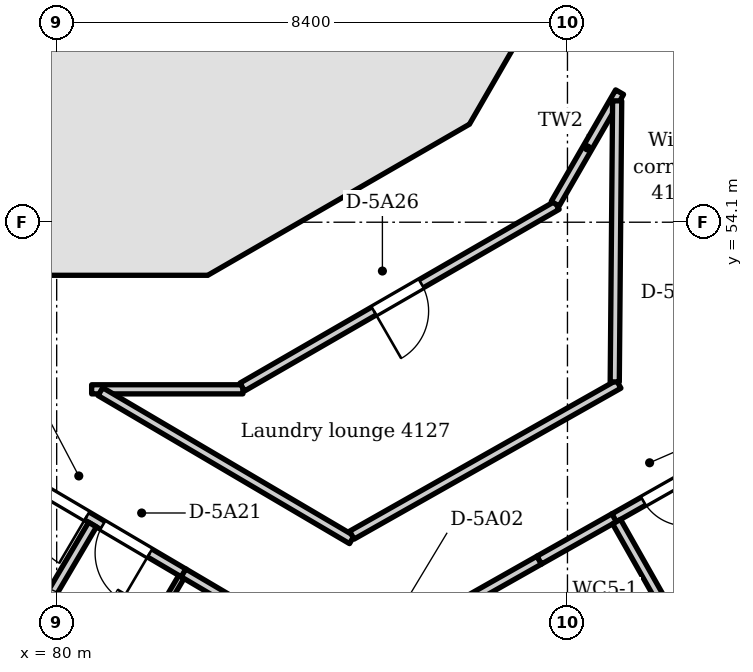
"""IFC4 building model, lengths in metres.
Left out: names, types, materials, properties, quantities, classifications, styles, units other than length and angle.
Written with IfcOpenShell. Run it as: python <this file> out.ifc"""

import sys

from ifc_helpers import new_model, si_unit, direction, frame, frame_2d, origin, place, context, subcontext, project, spatial, polyline, rectangle, outline, extrude, element, fill, save


model = new_model("IFC4")
c1 = context("Model", 3, precision=1e-05, world=origin(), true_north=direction((0.0, 1.0)))
c2 = subcontext(c1, "Body", "Model", "MODEL_VIEW")
j1 = project(units=[si_unit("LENGTHUNIT", "METRE"), si_unit("PLANEANGLEUNIT", "RADIAN")], contexts=[c1])
p1 = place(None, origin())
s1 = spatial("IfcSite", under=j1, at=p1, CompositionType="ELEMENT")
p2 = place(p1, origin())
s2 = spatial("IfcBuilding", under=s1, at=p2, CompositionType="ELEMENT")
p3 = place(p2, frame((0.0, 0.0, 161.1)))
s3 = spatial("IfcBuildingStorey", under=s2, at=p3, CompositionType="ELEMENT", Elevation=161.1)
p4 = place(p3, frame((77.515, 53.677, 0.0), z_axis=(0.0, 0.0, 1.0), x_axis=(1.0, 0.0, 0.0)))
e1 = element("IfcWall", 1, at=p4, inside=s3, PredefinedType="SHEAR", context=c2, shape_type="SweptSolid", body=[
    extrude(outline(polyline([(0.0, -0.45), (4.969, -0.45), (4.728, 0.45), (0.241, 0.45), (0.0, -0.45)])), origin(), (0.0, 0.0, 1.0), 3.6),
])
p5 = place(p4, frame((1.485, 0.0, 0.0)))
e2 = element("IfcOpeningElement", 2, at=p5, cuts=e1, PredefinedType="OPENING", context=c2, shape_type="SweptSolid", body=[
    extrude(rectangle(XDim=2.0, YDim=2.1, at=frame_2d((1.0, 1.05))), frame((0.0, 0.46, 0.0), z_axis=(0.0, -1.0, 0.0), x_axis=(1.0, 0.0, 0.0)), (0.0, 0.0, 1.0), 0.92),
])
p6 = place(p3, frame((82.26, 53.617, 0.0), z_axis=(0.0, 0.0, 1.0), x_axis=(0.866003133579, 0.500038571144, 0.0)))
e3 = element("IfcWall", 3, at=p6, inside=s3, PredefinedType="SHEAR", context=c2, shape_type="SweptSolid", body=[
    extrude(outline(polyline([(0.0, -0.45), (4.969, -0.45), (4.728, 0.45), (0.241, 0.45), (0.0, -0.45)])), origin(), (0.0, 0.0, 1.0), 3.6),
])
p7 = place(p6, frame((0.895, 0.0, 0.0)))
e4 = element("IfcOpeningElement", 4, at=p7, cuts=e3, PredefinedType="OPENING", context=c2, shape_type="SweptSolid", body=[
    extrude(rectangle(XDim=0.9, YDim=2.1, at=frame_2d((0.45, 1.05))), frame((0.0, 0.46, 0.0), z_axis=(0.0, -1.0, 0.0), x_axis=(1.0, 0.0, 0.0)), (0.0, 0.0, 1.0), 0.92),
])
p8 = place(p6, frame((3.184, 0.0, 0.0)))
e5 = element("IfcOpeningElement", 5, at=p8, cuts=e3, PredefinedType="OPENING", context=c2, shape_type="SweptSolid", body=[
    extrude(rectangle(XDim=0.9, YDim=2.1, at=frame_2d((0.45, 1.05))), frame((0.0, 0.46, 0.0), z_axis=(0.0, -1.0, 0.0), x_axis=(1.0, 0.0, 0.0)), (0.0, 0.0, 1.0), 0.92),
])
p9 = place(p3, frame((86.398, 55.937, 0.0), z_axis=(0.0, 0.0, 1.0), x_axis=(0.500038571144, 0.866003133579, 0.0)))
e6 = element("IfcWall", 6, at=p9, inside=s3, PredefinedType="SHEAR", context=c2, shape_type="SweptSolid", body=[
    extrude(outline(polyline([(0.0, -0.45), (4.969, -0.45), (4.728, 0.45), (0.241, 0.45), (0.0, -0.45)])), origin(), (0.0, 0.0, 1.0), 3.6),
])
p10 = place(p9, frame((1.785, 0.0, 0.0)))
e7 = element("IfcOpeningElement", 7, at=p10, cuts=e6, PredefinedType="OPENING", context=c2, shape_type="SweptSolid", body=[
    extrude(rectangle(XDim=1.4, YDim=2.1, at=frame_2d((0.7, 1.05))), frame((0.0, 0.46, 0.0), z_axis=(0.0, -1.0, 0.0), x_axis=(1.0, 0.0, 0.0)), (0.0, 0.0, 1.0), 0.92),
])
p11 = place(p3, frame((81.15, 59.1, 0.0), z_axis=(0.0, 0.0, 1.0), x_axis=(0.0, -1.0, 0.0)))
e8 = element("IfcWall", 8, at=p11, inside=s3, PredefinedType="SHEAR", context=c2, shape_type="SweptSolid", body=[
    extrude(rectangle(XDim=4.973, YDim=0.3, at=frame_2d((2.487, 0.0))), origin(), (0.0, 0.0, 1.0), 3.6),
])
p12 = place(p11, frame((1.3, 0.0, 0.0)))
e9 = element("IfcOpeningElement", 9, at=p12, cuts=e8, PredefinedType="OPENING", context=c2, shape_type="SweptSolid", body=[
    extrude(rectangle(XDim=1.1, YDim=2.1, at=frame_2d((0.55, 1.05))), frame((0.0, 0.16, 0.0), z_axis=(0.0, -1.0, 0.0), x_axis=(1.0, 0.0, 0.0)), (0.0, 0.0, 1.0), 0.32),
])
p13 = place(p3, frame((80.225, 60.552, 0.0), z_axis=(0.0, 0.0, 1.0), x_axis=(0.866028135082, -0.499995269223, 0.0)))
e10 = element("IfcWall", 10, at=p13, inside=s3, PredefinedType="SHEAR", context=c2, shape_type="SweptSolid", body=[
    extrude(rectangle(XDim=7.204, YDim=0.3, at=frame_2d((3.602, 0.0))), origin(), (0.0, 0.0, 1.0), 3.6),
])
p14 = place(p3, frame((80.354, 60.886, 0.0), z_axis=(0.0, 0.0, 1.0), x_axis=(-0.866047706748, -0.499961368145, 0.0)))
e11 = element("IfcWall", 11, at=p14, inside=s3, PredefinedType="SHEAR", context=c2, shape_type="SweptSolid", body=[
    extrude(rectangle(XDim=7.873, YDim=0.3, at=frame_2d((3.936, 0.0))), origin(), (0.0, 0.0, 1.0), 3.6),
])
p15 = place(p3, frame((90.139, 36.597, 0.0), z_axis=(0.0, 0.0, 1.0), x_axis=(-0.861630336939, 0.507536365659, 0.0)))
e12 = element("IfcWall", 12, at=p15, inside=s3, PredefinedType="SOLIDWALL", context=c2, shape_type="SweptSolid", body=[
    extrude(outline(polyline([(0.149, 0.075), (0.149, -0.075), (43.617, -0.075), (43.617, 0.075), (0.149, 0.075)])), origin(), (0.0, 0.0, 1.0), 3.3),
])
p16 = place(p15, frame((1.224, 0.0, 0.0)))
e13 = element("IfcOpeningElement", 13, at=p16, cuts=e12, PredefinedType="OPENING", context=c2, shape_type="SweptSolid", body=[
    extrude(rectangle(XDim=1.8, YDim=2.6, at=frame_2d((0.9, 1.3))), frame((0.0, 0.085, 0.0), z_axis=(0.0, -1.0, 0.0), x_axis=(1.0, 0.0, 0.0)), (0.0, 0.0, 1.0), 0.17),
])
p17 = place(p15, frame((4.571, 0.0, 0.0)))
e14 = element("IfcOpeningElement", 14, at=p17, cuts=e12, PredefinedType="OPENING", context=c2, shape_type="SweptSolid", body=[
    extrude(rectangle(XDim=1.8, YDim=2.6, at=frame_2d((0.9, 1.3))), frame((0.0, 0.085, 0.0), z_axis=(0.0, -1.0, 0.0), x_axis=(1.0, 0.0, 0.0)), (0.0, 0.0, 1.0), 0.17),
])
p18 = place(p15, frame((8.218, 0.0, 0.0)))
e15 = element("IfcOpeningElement", 15, at=p18, cuts=e12, PredefinedType="OPENING", context=c2, shape_type="SweptSolid", body=[
    extrude(rectangle(XDim=1.8, YDim=2.6, at=frame_2d((0.9, 1.3))), frame((0.0, 0.085, 0.0), z_axis=(0.0, -1.0, 0.0), x_axis=(1.0, 0.0, 0.0)), (0.0, 0.0, 1.0), 0.17),
])
p19 = place(p15, frame((11.865, 0.0, 0.0)))
e16 = element("IfcOpeningElement", 16, at=p19, cuts=e12, PredefinedType="OPENING", context=c2, shape_type="SweptSolid", body=[
    extrude(rectangle(XDim=1.8, YDim=2.6, at=frame_2d((0.9, 1.3))), frame((0.0, 0.085, 0.0), z_axis=(0.0, -1.0, 0.0), x_axis=(1.0, 0.0, 0.0)), (0.0, 0.0, 1.0), 0.17),
])
p20 = place(p15, frame((15.512, 0.0, 0.0)))
e17 = element("IfcOpeningElement", 17, at=p20, cuts=e12, PredefinedType="OPENING", context=c2, shape_type="SweptSolid", body=[
    extrude(rectangle(XDim=1.8, YDim=2.6, at=frame_2d((0.9, 1.3))), frame((0.0, 0.085, 0.0), z_axis=(0.0, -1.0, 0.0), x_axis=(1.0, 0.0, 0.0)), (0.0, 0.0, 1.0), 0.17),
])
p21 = place(p15, frame((19.16, 0.0, 0.0)))
e18 = element("IfcOpeningElement", 18, at=p21, cuts=e12, PredefinedType="OPENING", context=c2, shape_type="SweptSolid", body=[
    extrude(rectangle(XDim=1.8, YDim=2.6, at=frame_2d((0.9, 1.3))), frame((0.0, 0.085, 0.0), z_axis=(0.0, -1.0, 0.0), x_axis=(1.0, 0.0, 0.0)), (0.0, 0.0, 1.0), 0.17),
])
p22 = place(p15, frame((22.807, 0.0, 0.0)))
e19 = element("IfcOpeningElement", 19, at=p22, cuts=e12, PredefinedType="OPENING", context=c2, shape_type="SweptSolid", body=[
    extrude(rectangle(XDim=1.8, YDim=2.6, at=frame_2d((0.9, 1.3))), frame((0.0, 0.085, 0.0), z_axis=(0.0, -1.0, 0.0), x_axis=(1.0, 0.0, 0.0)), (0.0, 0.0, 1.0), 0.17),
])
p23 = place(p15, frame((26.454, 0.0, 0.0)))
e20 = element("IfcOpeningElement", 20, at=p23, cuts=e12, PredefinedType="OPENING", context=c2, shape_type="SweptSolid", body=[
    extrude(rectangle(XDim=1.8, YDim=2.6, at=frame_2d((0.9, 1.3))), frame((0.0, 0.085, 0.0), z_axis=(0.0, -1.0, 0.0), x_axis=(1.0, 0.0, 0.0)), (0.0, 0.0, 1.0), 0.17),
])
p24 = place(p15, frame((30.101, 0.0, 0.0)))
e21 = element("IfcOpeningElement", 21, at=p24, cuts=e12, PredefinedType="OPENING", context=c2, shape_type="SweptSolid", body=[
    extrude(rectangle(XDim=1.8, YDim=2.6, at=frame_2d((0.9, 1.3))), frame((0.0, 0.085, 0.0), z_axis=(0.0, -1.0, 0.0), x_axis=(1.0, 0.0, 0.0)), (0.0, 0.0, 1.0), 0.17),
])
p25 = place(p15, frame((33.748, 0.0, 0.0)))
e22 = element("IfcOpeningElement", 22, at=p25, cuts=e12, PredefinedType="OPENING", context=c2, shape_type="SweptSolid", body=[
    extrude(rectangle(XDim=1.8, YDim=2.6, at=frame_2d((0.9, 1.3))), frame((0.0, 0.085, 0.0), z_axis=(0.0, -1.0, 0.0), x_axis=(1.0, 0.0, 0.0)), (0.0, 0.0, 1.0), 0.17),
])
p26 = place(p15, frame((37.396, 0.0, 0.0)))
e23 = element("IfcOpeningElement", 23, at=p26, cuts=e12, PredefinedType="OPENING", context=c2, shape_type="SweptSolid", body=[
    extrude(rectangle(XDim=1.8, YDim=2.6, at=frame_2d((0.9, 1.3))), frame((0.0, 0.085, 0.0), z_axis=(0.0, -1.0, 0.0), x_axis=(1.0, 0.0, 0.0)), (0.0, 0.0, 1.0), 0.17),
])
p27 = place(p15, frame((40.743, 0.0, 0.0)))
e24 = element("IfcOpeningElement", 24, at=p27, cuts=e12, PredefinedType="OPENING", context=c2, shape_type="SweptSolid", body=[
    extrude(rectangle(XDim=1.8, YDim=2.6, at=frame_2d((0.9, 1.3))), frame((0.0, 0.085, 0.0), z_axis=(0.0, -1.0, 0.0), x_axis=(1.0, 0.0, 0.0)), (0.0, 0.0, 1.0), 0.17),
])
p28 = place(p3, frame((76.96, 51.352, 0.0), z_axis=(0.0, 0.0, 1.0), x_axis=(0.861634811964, -0.507528768457, 0.0)))
e25 = element("IfcWall", 25, at=p28, inside=s3, PredefinedType="PARTITIONING", context=c2, shape_type="SweptSolid", body=[
    extrude(rectangle(XDim=5.956, YDim=0.15, at=frame_2d((2.978, 0.0))), origin(), (0.0, 0.0, 1.0), 3.3),
])
p29 = place(p28, frame((4.406, 0.0, 0.0)))
e26 = element("IfcOpeningElement", 26, at=p29, cuts=e25, PredefinedType="OPENING", context=c2, shape_type="SweptSolid", body=[
    extrude(rectangle(XDim=0.9, YDim=2.1, at=frame_2d((0.45, 1.05))), frame((0.0, 0.085, 0.0), z_axis=(0.0, -1.0, 0.0), x_axis=(1.0, 0.0, 0.0)), (0.0, 0.0, 1.0), 0.17),
])
p30 = place(p28, frame((3.206, 0.0, 0.0)))
e27 = element("IfcOpeningElement", 27, at=p30, cuts=e25, PredefinedType="OPENING", context=c2, shape_type="SweptSolid", body=[
    extrude(rectangle(XDim=0.9, YDim=2.1, at=frame_2d((0.45, 1.05))), frame((0.0, 0.085, 0.0), z_axis=(0.0, -1.0, 0.0), x_axis=(1.0, 0.0, 0.0)), (0.0, 0.0, 1.0), 0.17),
])
p31 = place(p3, frame((77.607, 44.066, 0.0), z_axis=(0.0, 0.0, 1.0), x_axis=(0.507572206676, 0.861609224074, 0.0)))
e28 = element("IfcWall", 28, at=p31, inside=s3, PredefinedType="PARTITIONING", context=c2, shape_type="SweptSolid", body=[
    extrude(rectangle(XDim=5.874, YDim=0.15, at=frame_2d((2.937, 0.0))), origin(), (0.0, 0.0, 1.0), 3.3),
])
p32 = place(p3, frame((80.575, 51.352, 0.0), z_axis=(0.0, 0.0, 1.0), x_axis=(1.0, 0.0, 0.0)))
e29 = element("IfcWall", 29, at=p32, inside=s3, PredefinedType="PARTITIONING", context=c2, shape_type="SweptSolid", body=[
    extrude(rectangle(XDim=2.487, YDim=0.15, at=frame_2d((1.244, 0.0))), origin(), (0.0, 0.0, 1.0), 3.3),
])
p33 = place(p3, frame((80.719, 51.314, 0.0), z_axis=(0.0, 0.0, 1.0), x_axis=(0.86168823453, -0.507438061711, 0.0)))
e30 = element("IfcWall", 30, at=p33, inside=s3, PredefinedType="PARTITIONING", context=c2, shape_type="SweptSolid", body=[
    extrude(rectangle(XDim=4.799, YDim=0.15, at=frame_2d((2.399, 0.0))), origin(), (0.0, 0.0, 1.0), 3.3),
])
p34 = place(p3, frame((80.896, 46.306, 0.0), z_axis=(0.0, 0.0, 1.0), x_axis=(0.507376506277, 0.861724480839, 0.0)))
e31 = element("IfcWall", 31, at=p34, inside=s3, PredefinedType="PARTITIONING", context=c2, shape_type="SweptSolid", body=[
    extrude(rectangle(XDim=2.275, YDim=0.1, at=frame_2d((1.138, 0.0))), origin(), (0.0, 0.0, 1.0), 3.3),
])
p35 = place(p34, frame((0.762, 0.0, 0.0)))
e32 = element("IfcOpeningElement", 32, at=p35, cuts=e31, PredefinedType="OPENING", context=c2, shape_type="SweptSolid", body=[
    extrude(rectangle(XDim=0.8, YDim=2.1, at=frame_2d((0.4, 1.05))), frame((0.0, 0.06, 0.0), z_axis=(0.0, -1.0, 0.0), x_axis=(1.0, 0.0, 0.0)), (0.0, 0.0, 1.0), 0.12),
])
p36 = place(p3, frame((82.086, 48.333, 0.0), z_axis=(0.0, 0.0, 1.0), x_axis=(0.861462455733, -0.507821265174, 0.0)))
e33 = element("IfcWall", 33, at=p36, inside=s3, PredefinedType="PARTITIONING", context=c2, shape_type="SweptSolid", body=[
    extrude(rectangle(XDim=1.957, YDim=0.15, at=frame_2d((0.979, 0.0))), origin(), (0.0, 0.0, 1.0), 3.3),
])
p37 = place(p3, frame((83.052, 51.389, 0.0), z_axis=(0.0, 0.0, 1.0), x_axis=(0.866039280689, 0.499975963725, 0.0)))
e34 = element("IfcWall", 34, at=p37, inside=s3, PredefinedType="PARTITIONING", context=c2, shape_type="SweptSolid", body=[
    extrude(rectangle(XDim=5.974, YDim=0.15, at=frame_2d((2.987, 0.0))), origin(), (0.0, 0.0, 1.0), 2.75),
])
p38 = place(p37, frame((2.5, 0.0, 0.0)))
e35 = element("IfcOpeningElement", 35, at=p38, cuts=e34, PredefinedType="OPENING", context=c2, shape_type="SweptSolid", body=[
    extrude(rectangle(XDim=0.9, YDim=2.1, at=frame_2d((0.45, 1.05))), frame((0.0, 0.085, 0.0), z_axis=(0.0, -1.0, 0.0), x_axis=(1.0, 0.0, 0.0)), (0.0, 0.0, 1.0), 0.17),
])
p39 = place(p3, frame((84.835, 46.789, 0.0), z_axis=(0.0, 0.0, 1.0), x_axis=(0.870381542182, 0.492377874228, 0.0)))
e36 = element("IfcWall", 36, at=p39, inside=s3, PredefinedType="PARTITIONING", context=c2, shape_type="SweptSolid", body=[
    extrude(rectangle(XDim=3.562, YDim=0.15, at=frame_2d((1.781, 0.0))), origin(), (0.0, 0.0, 1.0), 2.75),
])
p40 = place(p39, frame((0.436, 0.0, 0.0)))
e37 = element("IfcOpeningElement", 37, at=p40, cuts=e36, PredefinedType="OPENING", context=c2, shape_type="SweptSolid", body=[
    extrude(rectangle(XDim=1.8, YDim=2.1, at=frame_2d((0.9, 1.05))), frame((0.0, 0.085, 0.0), z_axis=(0.0, -1.0, 0.0), x_axis=(1.0, 0.0, 0.0)), (0.0, 0.0, 1.0), 0.17),
])
p41 = place(p3, frame((84.854, 48.954, 0.0), z_axis=(0.0, 0.0, 1.0), x_axis=(0.870410364257, 0.492326921662, 0.0)))
e38 = element("IfcWall", 38, at=p41, inside=s3, PredefinedType="PARTITIONING", context=c2, shape_type="SweptSolid", body=[
    extrude(rectangle(XDim=5.041, YDim=0.15, at=frame_2d((2.521, 0.0))), origin(), (0.0, 0.0, 1.0), 2.75),
])
p42 = place(p3, frame((87.936, 48.543, 0.0), z_axis=(0.0, 0.0, 1.0), x_axis=(0.870505283706, 0.492159070871, 0.0)))
e39 = element("IfcWall", 39, at=p42, inside=s3, PredefinedType="PARTITIONING", context=c2, shape_type="SweptSolid", body=[
    extrude(rectangle(XDim=1.422, YDim=0.15, at=frame_2d((0.711, 0.0))), origin(), (0.0, 0.0, 1.0), 2.75),
])
p43 = place(p3, frame((88.198, 54.404, 0.0), z_axis=(0.0, 0.0, 1.0), x_axis=(0.499882057835, 0.866093487018, 0.0)))
e40 = element("IfcWall", 40, at=p43, inside=s3, PredefinedType="PARTITIONING", context=c2, shape_type="SweptSolid", body=[
    extrude(rectangle(XDim=2.119, YDim=0.15, at=frame_2d((1.059, 0.0))), origin(), (0.0, 0.0, 1.0), 3.3),
])
p44 = place(p3, frame((89.168, 49.239, 0.0), z_axis=(0.0, 0.0, 1.0), x_axis=(0.870049645281, 0.492964111013, 0.0)))
e41 = element("IfcWall", 41, at=p44, inside=s3, PredefinedType="PARTITIONING", context=c2, shape_type="SweptSolid", body=[
    extrude(rectangle(XDim=1.907, YDim=0.15, at=frame_2d((0.953, 0.0))), origin(), (0.0, 0.0, 1.0), 3.3),
])
p45 = place(p44, frame((0.553, 0.0, 0.0)))
e42 = element("IfcOpeningElement", 42, at=p45, cuts=e41, PredefinedType="OPENING", context=c2, shape_type="SweptSolid", body=[
    extrude(rectangle(XDim=0.8, YDim=2.1, at=frame_2d((0.4, 1.05))), frame((0.0, 0.085, 0.0), z_axis=(0.0, -1.0, 0.0), x_axis=(1.0, 0.0, 0.0)), (0.0, 0.0, 1.0), 0.17),
])
p46 = place(p3, frame((89.208, 49.176, 0.0), z_axis=(0.0, 0.0, 1.0), x_axis=(0.492490202922, -0.870317987879, 0.0)))
e43 = element("IfcWall", 43, at=p46, inside=s3, PredefinedType="PARTITIONING", context=c2, shape_type="SweptSolid", body=[
    extrude(rectangle(XDim=2.099, YDim=0.15, at=frame_2d((1.05, 0.0))), origin(), (0.0, 0.0, 1.0), 3.3),
])
p47 = place(p3, frame((89.177, 51.474, 0.0), z_axis=(0.0, 0.0, 1.0), x_axis=(0.008609896903, 0.999962934151, 0.0)))
e44 = element("IfcWall", 44, at=p47, inside=s3, PredefinedType="PARTITIONING", context=c2, shape_type="SweptSolid", body=[
    extrude(rectangle(XDim=4.622, YDim=0.15, at=frame_2d((2.311, 0.0))), origin(), (0.0, 0.0, 1.0), 3.3),
])
p48 = place(p3, frame((84.186, 55.249, 0.0), z_axis=(0.0, 0.0, 1.0), x_axis=(-0.499890179513, 0.866088799389, 0.0)))
e45 = element("IfcWall", 45, at=p48, inside=s3, PredefinedType="PARTITIONING", context=c2, shape_type="SweptSolid", body=[
    extrude(rectangle(XDim=0.882, YDim=0.15, at=frame_2d((0.441, 0.0))), origin(), (0.0, 0.0, 1.0), 3.3),
])
p49 = place(p3, frame((81.3, 56.15, 0.0), z_axis=(0.0, 0.0, 1.0), x_axis=(1.0, 0.0, 0.0)))
e46 = element("IfcWall", 46, at=p49, inside=s3, PredefinedType="PARTITIONING", context=c2, shape_type="SweptSolid", body=[
    extrude(rectangle(XDim=2.4, YDim=0.2, at=frame_2d((1.2, 0.0))), origin(), (0.0, 0.0, 1.0), 3.3),
])
p50 = place(p3, frame((83.8, 58.257, 0.0), z_axis=(0.0, 0.0, 1.0), x_axis=(0.0, -1.0, 0.0)))
e47 = element("IfcWall", 47, at=p50, inside=s3, PredefinedType="PARTITIONING", context=c2, shape_type="SweptSolid", body=[
    extrude(rectangle(XDim=2.207, YDim=0.2, at=frame_2d((1.104, 0.0))), origin(), (0.0, 0.0, 1.0), 3.3),
])
p51 = place(p45, frame((0.8, 0.0, 0.0), z_axis=(0.0, 0.0, 1.0), x_axis=(-1.0, 0.0, 0.0)))
e48 = element("IfcDoor", 48, at=p51, inside=s3, OperationType="SINGLE_SWING_LEFT", PredefinedType="DOOR", context=c2, shape_type="SweptSolid", body=[
    extrude(rectangle(XDim=0.8, YDim=2.1, at=frame_2d((0.4, 1.05))), frame((0.0, 0.025, 0.0), z_axis=(0.0, -1.0, 0.0), x_axis=(1.0, 0.0, 0.0)), (0.0, 0.0, 1.0), 0.05),
])
fill(e42, e48)
p52 = place(p29, frame((0.9, 0.0, 0.0), z_axis=(0.0, 0.0, 1.0), x_axis=(-1.0, 0.0, 0.0)))
e49 = element("IfcDoor", 49, at=p52, inside=s3, OperationType="SINGLE_SWING_LEFT", PredefinedType="DOOR", context=c2, shape_type="SweptSolid", body=[
    extrude(rectangle(XDim=0.9, YDim=2.1, at=frame_2d((0.45, 1.05))), frame((0.0, 0.025, 0.0), z_axis=(0.0, -1.0, 0.0), x_axis=(1.0, 0.0, 0.0)), (0.0, 0.0, 1.0), 0.05),
])
fill(e26, e49)
p53 = place(p30, frame((0.9, 0.0, 0.0), z_axis=(0.0, 0.0, 1.0), x_axis=(-1.0, 0.0, 0.0)))
e50 = element("IfcDoor", 50, at=p53, inside=s3, OperationType="SINGLE_SWING_LEFT", PredefinedType="DOOR", context=c2, shape_type="SweptSolid", body=[
    extrude(rectangle(XDim=0.9, YDim=2.1, at=frame_2d((0.45, 1.05))), frame((0.0, 0.025, 0.0), z_axis=(0.0, -1.0, 0.0), x_axis=(1.0, 0.0, 0.0)), (0.0, 0.0, 1.0), 0.05),
])
fill(e27, e50)
p54 = place(p38, frame((0.9, 0.0, 0.0), z_axis=(0.0, 0.0, 1.0), x_axis=(-1.0, 0.0, 0.0)))
e51 = element("IfcDoor", 51, at=p54, inside=s3, OperationType="SINGLE_SWING_RIGHT", PredefinedType="DOOR", context=c2, shape_type="SweptSolid", body=[
    extrude(rectangle(XDim=0.9, YDim=2.1, at=frame_2d((0.45, 1.05))), frame((0.0, 0.025, 0.0), z_axis=(0.0, -1.0, 0.0), x_axis=(1.0, 0.0, 0.0)), (0.0, 0.0, 1.0), 0.05),
])
fill(e35, e51)
p55 = place(p5, origin())
e52 = element("IfcDoor", 52, at=p55, inside=s3, OperationType="DOUBLE_DOOR_SINGLE_SWING", PredefinedType="DOOR", context=c2, shape_type="SweptSolid", body=[
    extrude(rectangle(XDim=2.0, YDim=2.1, at=frame_2d((1.0, 1.05))), frame((0.0, 0.025, 0.0), z_axis=(0.0, -1.0, 0.0), x_axis=(1.0, 0.0, 0.0)), (0.0, 0.0, 1.0), 0.05),
])
fill(e2, e52)
p56 = place(p12, origin())
e53 = element("IfcDoor", 53, at=p56, inside=s3, OperationType="DOUBLE_DOOR_SLIDING", PredefinedType="DOOR", context=c2, shape_type="SweptSolid", body=[
    extrude(rectangle(XDim=1.1, YDim=2.1, at=frame_2d((0.55, 1.05))), frame((0.0, 0.025, 0.0), z_axis=(0.0, -1.0, 0.0), x_axis=(1.0, 0.0, 0.0)), (0.0, 0.0, 1.0), 0.05),
])
fill(e9, e53)
p57 = place(p7, origin())
e54 = element("IfcDoor", 54, at=p57, inside=s3, OperationType="SINGLE_SWING_LEFT", PredefinedType="DOOR", context=c2, shape_type="SweptSolid", body=[
    extrude(rectangle(XDim=0.9, YDim=2.1, at=frame_2d((0.45, 1.05))), frame((0.0, 0.175, 0.0), z_axis=(0.0, -1.0, 0.0), x_axis=(1.0, 0.0, 0.0)), (0.0, 0.0, 1.0), 0.05),
])
fill(e4, e54)
p58 = place(p8, origin())
e55 = element("IfcDoor", 55, at=p58, inside=s3, OperationType="SINGLE_SWING_RIGHT", PredefinedType="DOOR", context=c2, shape_type="SweptSolid", body=[
    extrude(rectangle(XDim=0.9, YDim=2.1, at=frame_2d((0.45, 1.05))), frame((0.0, 0.175, 0.0), z_axis=(0.0, -1.0, 0.0), x_axis=(1.0, 0.0, 0.0)), (0.0, 0.0, 1.0), 0.05),
])
fill(e5, e55)
save(model, sys.argv[1])
